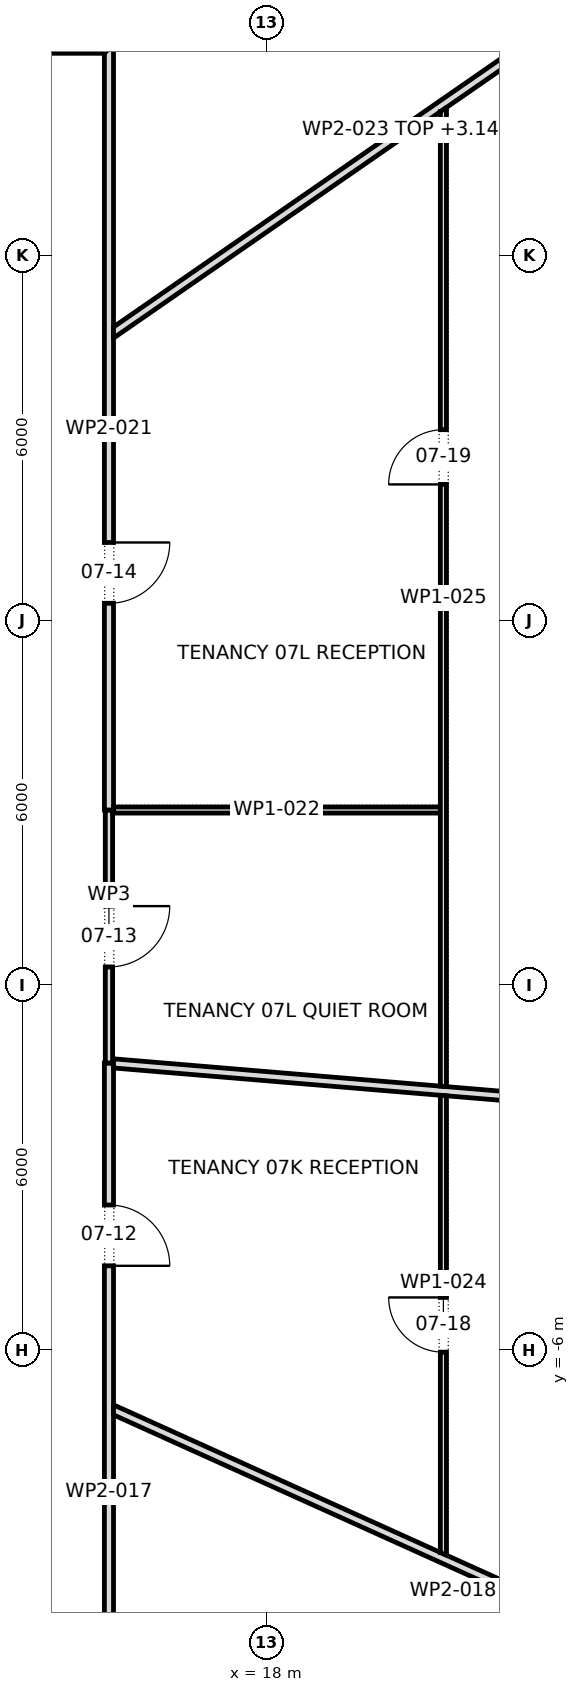
"""IFC4 building model, lengths in metres.
Left out: names, types, materials, properties, quantities, classifications, styles, units other than length and angle.
Written with IfcOpenShell. Run it as: python <this file> out.ifc"""

import sys

from ifc_helpers import new_model, si_unit, direction, frame, frame_2d, origin, place, context, subcontext, project, spatial, polyline, rectangle, outline, extrude, element, fill, save


model = new_model("IFC4")
c1 = context("Model", 3, precision=1e-05, world=origin(), true_north=direction((0.0, 1.0)))
c2 = subcontext(c1, "Body", "Model", "MODEL_VIEW")
j1 = project(units=[si_unit("LENGTHUNIT", "METRE"), si_unit("PLANEANGLEUNIT", "RADIAN")], contexts=[c1])
p1 = place(None, origin())
s1 = spatial("IfcSite", under=j1, at=p1, CompositionType="ELEMENT")
p2 = place(p1, origin())
s2 = spatial("IfcBuilding", under=s1, at=p2, CompositionType="ELEMENT")
p3 = place(p2, frame((0.0, 0.0, 112.9)))
s3 = spatial("IfcBuildingStorey", under=s2, at=p3, CompositionType="ELEMENT", Elevation=112.9)
p4 = place(p3, frame((-15.475, 15.4, 0.0), z_axis=(0.0, 0.0, 1.0), x_axis=(1.0, 0.0, 0.0)))
e1 = element("IfcWall", 1, at=p4, inside=s3, PredefinedType="PARTITIONING", context=c2, shape_type="SweptSolid", body=[
    extrude(outline(polyline([(0.15, -0.075), (2.066, -0.075), (3.981, -0.075), (5.897, -0.075), (7.812, -0.075), (9.728, -0.075), (11.644, -0.075), (13.56, -0.075), (15.475, -0.075), (17.391, -0.075), (19.306, -0.075), (21.222, -0.075), (23.138, -0.075), (25.053, -0.075), (26.969, -0.075), (28.885, -0.075), (30.8, -0.075), (30.95, 0.075), (29.016, 0.075), (27.081, 0.075), (25.147, 0.075), (23.212, 0.075), (21.278, 0.075), (19.344, 0.075), (17.409, 0.075), (15.475, 0.075), (13.541, 0.075), (11.606, 0.075), (9.672, 0.075), (7.738, 0.075), (5.803, 0.075), (3.869, 0.075), (1.935, 0.075), (0.0, 0.075), (0.15, -0.075)])), origin(), (0.0, 0.0, 1.0), 3.9),
])
p5 = place(p4, frame((27.545, 0.0, 0.0)))
e2 = element("IfcOpeningElement", 2, at=p5, cuts=e1, PredefinedType="OPENING", context=c2, shape_type="SweptSolid", body=[
    extrude(rectangle(XDim=1.0, YDim=2.1, at=frame_2d((0.5, 1.05))), frame((0.0, 0.087, 0.0), z_axis=(0.0, -1.0, 0.0), x_axis=(1.0, 0.0, 0.0)), (0.0, 0.0, 1.0), 0.174),
])
p6 = place(p4, frame((18.545, 0.0, 0.0)))
e3 = element("IfcOpeningElement", 3, at=p6, cuts=e1, PredefinedType="OPENING", context=c2, shape_type="SweptSolid", body=[
    extrude(rectangle(XDim=1.8, YDim=2.1, at=frame_2d((0.9, 1.05))), frame((0.0, 0.087, 0.0), z_axis=(0.0, -1.0, 0.0), x_axis=(1.0, 0.0, 0.0)), (0.0, 0.0, 1.0), 0.174),
])
p7 = place(p4, frame((6.195, 0.0, 0.0)))
e4 = element("IfcOpeningElement", 4, at=p7, cuts=e1, PredefinedType="OPENING", context=c2, shape_type="SweptSolid", body=[
    extrude(rectangle(XDim=1.8, YDim=2.1, at=frame_2d((0.9, 1.05))), frame((0.0, 0.087, 0.0), z_axis=(0.0, -1.0, 0.0), x_axis=(1.0, 0.0, 0.0)), (0.0, 0.0, 1.0), 0.174),
])
p8 = place(p3, frame((15.4, -15.475, 0.0), z_axis=(0.0, 0.0, 1.0), x_axis=(0.0, 1.0, 0.0)))
e5 = element("IfcWall", 5, at=p8, inside=s3, PredefinedType="PARTITIONING", context=c2, shape_type="SweptSolid", body=[
    extrude(outline(polyline([(14.195, 0.075), (12.439, 0.075), (10.684, 0.075), (8.928, 0.075), (7.173, 0.075), (5.417, 0.075), (3.661, 0.075), (1.906, 0.075), (0.15, 0.075), (0.0, -0.075), (1.775, -0.075), (3.549, -0.075), (5.323, -0.075), (7.098, -0.075), (8.872, -0.075), (10.646, -0.075), (12.421, -0.075), (14.195, -0.075), (14.195, 0.075)])), origin(), (0.0, 0.0, 1.0), 3.9),
])
p9 = place(p8, frame((3.8, 0.0, 0.0)))
e6 = element("IfcOpeningElement", 6, at=p9, cuts=e5, PredefinedType="OPENING", context=c2, shape_type="SweptSolid", body=[
    extrude(rectangle(XDim=1.0, YDim=2.1, at=frame_2d((0.5, 1.05))), frame((0.0, 0.087, 0.0), z_axis=(0.0, -1.0, 0.0), x_axis=(1.0, 0.0, 0.0)), (0.0, 0.0, 1.0), 0.174),
])
p10 = place(p8, frame((10.86, 0.0, 0.0)))
e7 = element("IfcOpeningElement", 7, at=p10, cuts=e5, PredefinedType="OPENING", context=c2, shape_type="SweptSolid", body=[
    extrude(rectangle(XDim=1.0, YDim=2.1, at=frame_2d((0.5, 1.05))), frame((0.0, 0.087, 0.0), z_axis=(0.0, -1.0, 0.0), x_axis=(1.0, 0.0, 0.0)), (0.0, 0.0, 1.0), 0.174),
])
p11 = place(p3, frame((15.444, -6.97, 0.0), z_axis=(0.0, 0.0, 1.0), x_axis=(0.911385678544, -0.411553331835, 0.0)))
e8 = element("IfcWall", 8, at=p11, inside=s3, PredefinedType="PARTITIONING", context=c2, shape_type="SweptSolid", body=[
    extrude(outline(polyline([(0.068, -0.075), (1.869, -0.075), (3.67, -0.075), (5.471, -0.075), (7.272, -0.075), (9.074, -0.075), (10.875, -0.075), (12.676, -0.075), (14.477, -0.075), (14.495, -0.004), (14.497, 0.058), (14.497, 0.075), (12.778, 0.075), (11.058, 0.075), (9.339, 0.075), (7.62, 0.075), (5.9, 0.075), (5.898, 0.074), (5.898, 0.075), (3.932, 0.075), (1.966, 0.075), (0.0, 0.075), (0.068, -0.075)])), origin(), (0.0, 0.0, 1.0), 2.91),
])
p12 = place(p3, frame((15.454, -1.284, 0.0), z_axis=(0.0, 0.0, 1.0), x_axis=(0.996525641357, -0.083286530234, 0.0)))
e9 = element("IfcWall", 9, at=p12, inside=s3, PredefinedType="PARTITIONING", context=c2, shape_type="SweptSolid", body=[
    extrude(outline(polyline([(0.028, -0.075), (1.905, -0.075), (3.783, -0.075), (5.66, -0.075), (7.538, -0.075), (9.416, -0.075), (11.293, -0.075), (13.171, -0.075), (15.048, -0.075), (16.926, -0.075), (16.931, -0.038), (16.931, 0.075), (15.05, 0.075), (13.169, 0.075), (11.288, 0.075), (9.406, 0.075), (7.525, 0.075), (5.644, 0.075), (3.762, 0.075), (1.881, 0.075), (0.0, 0.075), (0.0, 0.074), (0.006, 0.005), (0.021, 0.006), (0.028, -0.075)])), origin(), (0.0, 0.0, 1.0), 2.91),
])
p13 = place(p3, frame((15.4, 2.88, 0.0), z_axis=(0.0, 0.0, 1.0), x_axis=(0.0, -1.0, 0.0)))
e10 = element("IfcWall", 10, at=p13, inside=s3, PredefinedType="PARTITIONING", context=c2, shape_type="SweptSolid", body=[
    extrude(rectangle(XDim=4.16, YDim=0.12, at=frame_2d((2.08, 0.0))), origin(), (0.0, 0.0, 1.0), 3.9),
])
p14 = place(p13, frame((1.58, 0.0, 0.0)))
e11 = element("IfcOpeningElement", 11, at=p14, cuts=e10, PredefinedType="OPENING", context=c2, shape_type="SweptSolid", body=[
    extrude(rectangle(XDim=1.0, YDim=2.1, at=frame_2d((0.5, 1.05))), frame((0.0, 0.072, 0.0), z_axis=(0.0, -1.0, 0.0), x_axis=(1.0, 0.0, 0.0)), (0.0, 0.0, 1.0), 0.144),
])
p15 = place(p3, frame((15.4, 2.88, 0.0), z_axis=(0.0, 0.0, 1.0), x_axis=(0.0, 1.0, 0.0)))
e12 = element("IfcWall", 12, at=p15, inside=s3, PredefinedType="PARTITIONING", context=c2, shape_type="SweptSolid", body=[
    extrude(outline(polyline([(0.0, -0.075), (1.799, -0.075), (3.599, -0.075), (5.398, -0.075), (7.197, -0.075), (8.996, -0.075), (10.796, -0.075), (12.595, -0.075), (12.445, 0.075), (10.667, 0.075), (8.889, 0.075), (7.112, 0.075), (5.333, 0.075), (3.556, 0.075), (1.778, 0.075), (0.0, 0.075), (0.0, -0.075)])), origin(), (0.0, 0.0, 1.0), 3.9),
])
p16 = place(p15, frame((3.4, 0.0, 0.0)))
e13 = element("IfcOpeningElement", 13, at=p16, cuts=e12, PredefinedType="OPENING", context=c2, shape_type="SweptSolid", body=[
    extrude(rectangle(XDim=1.0, YDim=2.1, at=frame_2d((0.5, 1.05))), frame((0.0, 0.087, 0.0), z_axis=(0.0, -1.0, 0.0), x_axis=(1.0, 0.0, 0.0)), (0.0, 0.0, 1.0), 0.174),
])
p17 = place(p3, frame((15.46, 2.88, 0.0), z_axis=(0.0, 0.0, 1.0), x_axis=(1.0, 0.0, 0.0)))
e14 = element("IfcWall", 14, at=p17, inside=s3, PredefinedType="PARTITIONING", context=c2, shape_type="SweptSolid", body=[
    extrude(outline(polyline([(0.0, -0.05), (1.797, -0.05), (3.593, -0.05), (5.39, -0.05), (5.39, 0.05), (3.598, 0.05), (1.806, 0.05), (0.015, 0.05), (0.015, 0.0), (0.0, 0.0), (0.0, -0.05)])), origin(), (0.0, 0.0, 1.0), 3.9),
])
p18 = place(p3, frame((15.433, 10.702, 0.0), z_axis=(0.0, 0.0, 1.0), x_axis=(0.82202509952, 0.569451258458, 0.0)))
e15 = element("IfcWall", 15, at=p18, inside=s3, PredefinedType="PARTITIONING", context=c2, shape_type="SweptSolid", body=[
    extrude(outline(polyline([(0.0, -0.075), (1.635, -0.075), (3.269, -0.075), (4.904, -0.075), (6.538, -0.075), (6.54, -0.072), (6.544, -0.075), (8.291, -0.075), (10.038, -0.075), (11.785, -0.075), (11.785, -0.071), (11.78, 0.003), (11.761, 0.075), (9.818, 0.075), (7.875, 0.075), (5.932, 0.075), (3.989, 0.075), (2.046, 0.075), (0.104, 0.075), (0.0, -0.074), (0.0, -0.075)])), origin(), (0.0, 0.0, 1.0), 3.147),
])
p19 = place(p3, frame((20.9, -1.811, 0.0), z_axis=(0.0, 0.0, 1.0), x_axis=(0.0, -1.0, 0.0)))
e16 = element("IfcWall", 16, at=p19, inside=s3, PredefinedType="PARTITIONING", context=c2, shape_type="SweptSolid", body=[
    extrude(outline(polyline([(0.0, -0.05), (1.879, -0.05), (3.759, -0.05), (5.638, -0.05), (7.518, -0.05), (7.562, 0.049), (7.562, 0.05), (5.674, 0.05), (3.785, 0.05), (1.897, 0.05), (0.008, 0.05), (0.0, -0.047), (0.0, -0.05)])), origin(), (0.0, 0.0, 1.0), 3.9),
])
p20 = place(p19, frame((3.324, 0.0, 0.0)))
e17 = element("IfcOpeningElement", 17, at=p20, cuts=e16, PredefinedType="OPENING", context=c2, shape_type="SweptSolid", body=[
    extrude(rectangle(XDim=0.9, YDim=2.1, at=frame_2d((0.45, 1.05))), frame((0.0, 0.062, 0.0), z_axis=(0.0, -1.0, 0.0), x_axis=(1.0, 0.0, 0.0)), (0.0, 0.0, 1.0), 0.124),
])
p21 = place(p3, frame((20.9, -1.668, 0.0), z_axis=(0.0, 0.0, 1.0), x_axis=(0.0, 1.0, 0.0)))
e18 = element("IfcWall", 18, at=p21, inside=s3, PredefinedType="PARTITIONING", context=c2, shape_type="SweptSolid", body=[
    extrude(outline(polyline([(16.102, -0.05), (16.102, -0.05), (16.032, 0.05), (14.127, 0.05), (12.221, 0.05), (10.315, 0.05), (8.41, 0.05), (6.504, 0.05), (4.598, 0.05), (4.598, 0.05), (4.499, 0.05), (4.499, 0.05), (3.002, 0.05), (1.505, 0.05), (0.008, 0.05), (0.0, -0.049), (0.0, -0.05), (1.789, -0.05), (3.578, -0.05), (5.367, -0.05), (7.156, -0.05), (8.945, -0.05), (10.734, -0.05), (12.523, -0.05), (14.312, -0.05), (16.102, -0.05)])), origin(), (0.0, 0.0, 1.0), 3.9),
])
p22 = place(p21, frame((9.904, 0.0, 0.0)))
e19 = element("IfcOpeningElement", 19, at=p22, cuts=e18, PredefinedType="OPENING", context=c2, shape_type="SweptSolid", body=[
    extrude(rectangle(XDim=0.9, YDim=2.1, at=frame_2d((0.45, 1.05))), frame((0.0, 0.062, 0.0), z_axis=(0.0, -1.0, 0.0), x_axis=(1.0, 0.0, 0.0)), (0.0, 0.0, 1.0), 0.124),
])
p23 = place(p10, frame((1.0, 0.0, 0.0), z_axis=(0.0, 0.0, 1.0), x_axis=(-1.0, 0.0, 0.0)))
e20 = element("IfcDoor", 20, at=p23, inside=s3, OperationType="SINGLE_SWING_LEFT", PredefinedType="DOOR", context=c2, shape_type="SweptSolid", body=[
    extrude(rectangle(XDim=1.0, YDim=2.1, at=frame_2d((0.5, 1.05))), frame((0.0, 0.025, 0.0), z_axis=(0.0, -1.0, 0.0), x_axis=(1.0, 0.0, 0.0)), (0.0, 0.0, 1.0), 0.05),
])
fill(e7, e20)
p24 = place(p14, origin())
e21 = element("IfcDoor", 21, at=p24, inside=s3, OperationType="SINGLE_SWING_RIGHT", PredefinedType="DOOR", context=c2, shape_type="SweptSolid", body=[
    extrude(rectangle(XDim=1.0, YDim=2.1, at=frame_2d((0.5, 1.05))), frame((0.0, 0.025, 0.0), z_axis=(0.0, -1.0, 0.0), x_axis=(1.0, 0.0, 0.0)), (0.0, 0.0, 1.0), 0.05),
])
fill(e11, e21)
p25 = place(p16, frame((1.0, 0.0, 0.0), z_axis=(0.0, 0.0, 1.0), x_axis=(-1.0, 0.0, 0.0)))
e22 = element("IfcDoor", 22, at=p25, inside=s3, OperationType="SINGLE_SWING_RIGHT", PredefinedType="DOOR", context=c2, shape_type="SweptSolid", body=[
    extrude(rectangle(XDim=1.0, YDim=2.1, at=frame_2d((0.5, 1.05))), frame((0.0, 0.025, 0.0), z_axis=(0.0, -1.0, 0.0), x_axis=(1.0, 0.0, 0.0)), (0.0, 0.0, 1.0), 0.05),
])
fill(e13, e22)
p26 = place(p20, frame((0.9, 0.0, 0.0), z_axis=(0.0, 0.0, 1.0), x_axis=(-1.0, 0.0, 0.0)))
e23 = element("IfcDoor", 23, at=p26, inside=s3, OperationType="SINGLE_SWING_LEFT", PredefinedType="DOOR", context=c2, shape_type="SweptSolid", body=[
    extrude(rectangle(XDim=0.9, YDim=2.1, at=frame_2d((0.45, 1.05))), frame((0.0, 0.025, 0.0), z_axis=(0.0, -1.0, 0.0), x_axis=(1.0, 0.0, 0.0)), (0.0, 0.0, 1.0), 0.05),
])
fill(e17, e23)
p27 = place(p22, origin())
e24 = element("IfcDoor", 24, at=p27, inside=s3, OperationType="SINGLE_SWING_RIGHT", PredefinedType="DOOR", context=c2, shape_type="SweptSolid", body=[
    extrude(rectangle(XDim=0.9, YDim=2.1, at=frame_2d((0.45, 1.05))), frame((0.0, 0.025, 0.0), z_axis=(0.0, -1.0, 0.0), x_axis=(1.0, 0.0, 0.0)), (0.0, 0.0, 1.0), 0.05),
])
fill(e19, e24)
save(model, sys.argv[1])
